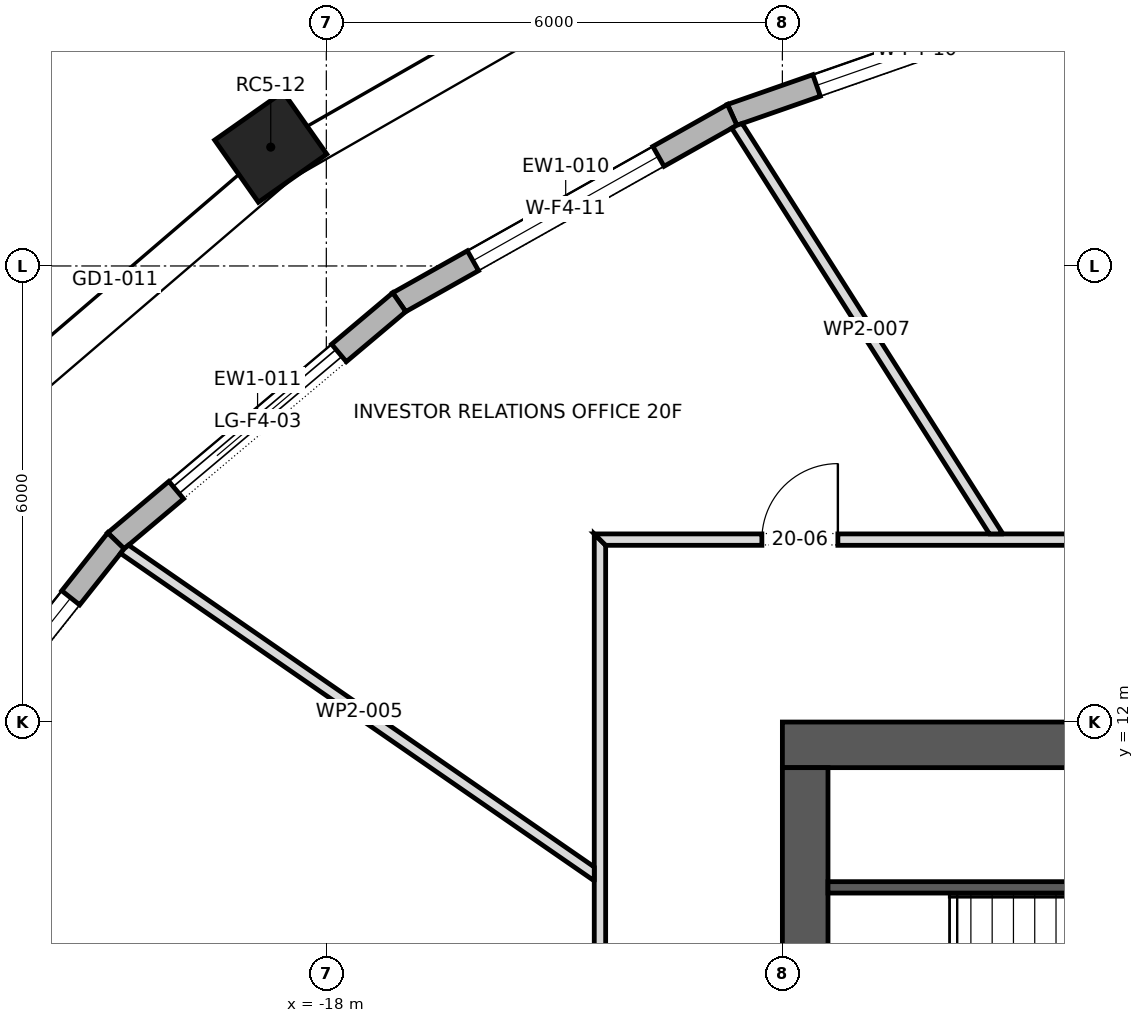
"""IFC4 building model, lengths in metres.
Left out: names, types, materials, properties, quantities, classifications, styles, units other than length and angle.
Written with IfcOpenShell. Run it as: python <this file> out.ifc"""

import sys

from ifc_helpers import new_model, si_unit, direction, frame, frame_2d, origin, origin_2d, place, context, subcontext, project, spatial, polyline, rectangle, outline, extrude, element, fill, save


model = new_model("IFC4")
c1 = context("Model", 3, precision=1e-05, world=origin(), true_north=direction((0.0, 1.0)))
c2 = subcontext(c1, "Body", "Model", "MODEL_VIEW")
j1 = project(units=[si_unit("LENGTHUNIT", "METRE"), si_unit("PLANEANGLEUNIT", "RADIAN")], contexts=[c1])
p1 = place(None, origin())
s1 = spatial("IfcSite", under=j1, at=p1, CompositionType="ELEMENT")
p2 = place(p1, origin())
s2 = spatial("IfcBuilding", under=s1, at=p2, CompositionType="ELEMENT")
p3 = place(p2, frame((0.0, 0.0, 280.3)))
s3 = spatial("IfcBuildingStorey", under=s2, at=p3, CompositionType="ELEMENT", Elevation=280.3)
p4 = place(p3, frame((-18.731, 19.564, 0.0), z_axis=(0.0, 0.0, 1.0), x_axis=(-0.817906779671, -0.575350762377, 0.0)))
e1 = element("IfcColumn", 1, at=p4, inside=s3, PredefinedType="COLUMN", context=c2, shape_type="SweptSolid", body=[
    extrude(rectangle(XDim=1.1, YDim=1.0, at=origin_2d()), origin(), (0.0, 0.0, 1.0), 4.0),
])
p5 = place(p3, frame((-12.0, 11.7, 0.0), z_axis=(0.0, 0.0, 1.0), x_axis=(1.0, 0.0, 0.0)))
e2 = element("IfcWall", 2, at=p5, inside=s3, PredefinedType="SHEAR", context=c2, shape_type="SweptSolid", body=[
    extrude(rectangle(XDim=24.0, YDim=0.6, at=frame_2d((12.0, 0.0))), origin(), (0.0, 0.0, 1.0), 4.0),
])
p6 = place(p5, frame((9.225, 0.0, 0.0)))
e3 = element("IfcOpeningElement", 3, at=p6, cuts=e2, PredefinedType="OPENING", context=c2, shape_type="SweptSolid", body=[
    extrude(rectangle(XDim=0.9, YDim=2.1, at=frame_2d((0.45, 1.05))), frame((0.0, 0.312, 0.0), z_axis=(0.0, -1.0, 0.0), x_axis=(1.0, 0.0, 0.0)), (0.0, 0.0, 1.0), 0.624),
])
p7 = place(p5, frame((10.925, 0.0, 0.0)))
e4 = element("IfcOpeningElement", 4, at=p7, cuts=e2, PredefinedType="OPENING", context=c2, shape_type="SweptSolid", body=[
    extrude(rectangle(XDim=0.8, YDim=2.1, at=frame_2d((0.4, 1.05))), frame((0.0, 0.312, 0.0), z_axis=(0.0, -1.0, 0.0), x_axis=(1.0, 0.0, 0.0)), (0.0, 0.0, 1.0), 0.624),
])
p8 = place(p5, frame((4.2, 0.0, 0.0)))
e5 = element("IfcOpeningElement", 5, at=p8, cuts=e2, PredefinedType="OPENING", context=c2, shape_type="SweptSolid", body=[
    extrude(rectangle(XDim=0.8, YDim=2.1, at=frame_2d((0.4, 1.05))), frame((0.0, 0.312, 0.0), z_axis=(0.0, -1.0, 0.0), x_axis=(1.0, 0.0, 0.0)), (0.0, 0.0, 1.0), 0.624),
])
p9 = place(p5, frame((13.8, 0.0, 0.0)))
e6 = element("IfcOpeningElement", 6, at=p9, cuts=e2, PredefinedType="OPENING", context=c2, shape_type="SweptSolid", body=[
    extrude(rectangle(XDim=0.8, YDim=2.1, at=frame_2d((0.4, 1.05))), frame((0.0, 0.312, 0.0), z_axis=(0.0, -1.0, 0.0), x_axis=(1.0, 0.0, 0.0)), (0.0, 0.0, 1.0), 0.624),
])
p10 = place(p5, frame((16.6, 0.0, 0.0)))
e7 = element("IfcOpeningElement", 7, at=p10, cuts=e2, PredefinedType="OPENING", context=c2, shape_type="SweptSolid", body=[
    extrude(rectangle(XDim=0.8, YDim=2.1, at=frame_2d((0.4, 1.05))), frame((0.0, 0.312, 0.0), z_axis=(0.0, -1.0, 0.0), x_axis=(1.0, 0.0, 0.0)), (0.0, 0.0, 1.0), 0.624),
])
p11 = place(p3, frame((-11.7, -11.4, 0.0), z_axis=(0.0, 0.0, 1.0), x_axis=(0.0, 1.0, 0.0)))
e8 = element("IfcWall", 8, at=p11, inside=s3, PredefinedType="SHEAR", context=c2, shape_type="SweptSolid", body=[
    extrude(rectangle(XDim=22.8, YDim=0.6, at=frame_2d((11.4, 0.0))), origin(), (0.0, 0.0, 1.0), 4.0),
])
p12 = place(p11, frame((10.2, 0.0, 0.0)))
e9 = element("IfcOpeningElement", 9, at=p12, cuts=e8, PredefinedType="OPENING", context=c2, shape_type="SweptSolid", body=[
    extrude(rectangle(XDim=2.4, YDim=2.1, at=frame_2d((1.2, 1.05))), frame((0.0, 0.312, 0.0), z_axis=(0.0, -1.0, 0.0), x_axis=(1.0, 0.0, 0.0)), (0.0, 0.0, 1.0), 0.624),
])
p13 = place(p11, frame((18.925, 0.0, 0.0)))
e10 = element("IfcOpeningElement", 10, at=p13, cuts=e8, PredefinedType="OPENING", context=c2, shape_type="SweptSolid", body=[
    extrude(rectangle(XDim=1.2, YDim=2.1, at=frame_2d((0.6, 1.05))), frame((0.0, 0.312, 0.0), z_axis=(0.0, -1.0, 0.0), x_axis=(1.0, 0.0, 0.0)), (0.0, 0.0, 1.0), 0.624),
])
p14 = place(p11, frame((2.675, 0.0, 0.0)))
e11 = element("IfcOpeningElement", 11, at=p14, cuts=e8, PredefinedType="OPENING", context=c2, shape_type="SweptSolid", body=[
    extrude(rectangle(XDim=1.2, YDim=2.1, at=frame_2d((0.6, 1.05))), frame((0.0, 0.312, 0.0), z_axis=(0.0, -1.0, 0.0), x_axis=(1.0, 0.0, 0.0)), (0.0, 0.0, 1.0), 0.624),
])
p15 = place(p3, frame((-7.796, 21.685, 0.0), z_axis=(0.0, 0.0, 1.0), x_axis=(-0.944204293701, -0.329360367617, 0.0)))
e12 = element("IfcWall", 12, at=p15, inside=s3, PredefinedType="STANDARD", context=c2, shape_type="SweptSolid", body=[
    extrude(outline(polyline([(-0.013, -0.15), (5.166, -0.15), (5.139, 0.15), (0.013, 0.15), (-0.013, -0.15)])), origin(), (0.0, 0.0, 1.0), 3.7),
])
p16 = place(p15, frame((1.176, 0.0, 0.6)))
e13 = element("IfcOpeningElement", 13, at=p16, cuts=e12, PredefinedType="OPENING", context=c2, shape_type="SweptSolid", body=[
    extrude(rectangle(XDim=2.8, YDim=2.65, at=frame_2d((1.4, 1.325))), frame((0.0, 0.162, 0.0), z_axis=(0.0, -1.0, 0.0), x_axis=(1.0, 0.0, 0.0)), (0.0, 0.0, 1.0), 0.324),
])
p17 = place(p3, frame((-12.661, 19.988, 0.0), z_axis=(0.0, 0.0, 1.0), x_axis=(-0.871488606878, -0.490415750239, 0.0)))
e14 = element("IfcWall", 14, at=p17, inside=s3, PredefinedType="STANDARD", context=c2, shape_type="SweptSolid", body=[
    extrude(outline(polyline([(-0.013, -0.15), (5.04, -0.15), (5.012, 0.15), (0.013, 0.15), (-0.013, -0.15)])), origin(), (0.0, 0.0, 1.0), 3.7),
])
p18 = place(p17, frame((1.113, 0.0, 0.6)))
e15 = element("IfcOpeningElement", 15, at=p18, cuts=e14, PredefinedType="OPENING", context=c2, shape_type="SweptSolid", body=[
    extrude(rectangle(XDim=2.8, YDim=2.65, at=frame_2d((1.4, 1.325))), frame((0.0, 0.162, 0.0), z_axis=(0.0, -1.0, 0.0), x_axis=(1.0, 0.0, 0.0)), (0.0, 0.0, 1.0), 0.324),
])
p19 = place(p3, frame((-17.041, 17.523, 0.0), z_axis=(0.0, 0.0, 1.0), x_axis=(-0.764876116592, -0.644177402792, 0.0)))
e16 = element("IfcWall", 16, at=p19, inside=s3, PredefinedType="STANDARD", context=c2, shape_type="SweptSolid", body=[
    extrude(outline(polyline([(-0.014, -0.15), (4.888, -0.15), (4.858, 0.15), (0.014, 0.15), (-0.014, -0.15)])), origin(), (0.0, 0.0, 1.0), 3.7),
])
p20 = place(p19, frame((1.036, 0.0, 0.0)))
e17 = element("IfcOpeningElement", 17, at=p20, cuts=e16, PredefinedType="OPENING", context=c2, shape_type="SweptSolid", body=[
    extrude(rectangle(XDim=2.8, YDim=3.25, at=frame_2d((1.4, 1.625))), frame((0.0, 0.162, 0.0), z_axis=(0.0, -1.0, 0.0), x_axis=(1.0, 0.0, 0.0)), (0.0, 0.0, 1.0), 0.324),
])
p21 = place(p3, frame((-20.768, 14.384, 0.0), z_axis=(0.0, 0.0, 1.0), x_axis=(-0.621544881236, -0.783378555112, 0.0)))
e18 = element("IfcWall", 18, at=p21, inside=s3, PredefinedType="STANDARD", context=c2, shape_type="SweptSolid", body=[
    extrude(outline(polyline([(-0.015, -0.15), (4.73, -0.15), (4.698, 0.15), (0.015, 0.15), (-0.015, -0.15)])), origin(), (0.0, 0.0, 1.0), 3.7),
])
p22 = place(p21, frame((0.957, 0.0, 0.6)))
e19 = element("IfcOpeningElement", 19, at=p22, cuts=e18, PredefinedType="OPENING", context=c2, shape_type="SweptSolid", body=[
    extrude(rectangle(XDim=2.8, YDim=2.65, at=frame_2d((1.4, 1.325))), frame((0.0, 0.162, 0.0), z_axis=(0.0, -1.0, 0.0), x_axis=(1.0, 0.0, 0.0)), (0.0, 0.0, 1.0), 0.324),
])
p23 = place(p3, frame((-11.4, 9.825, 0.0), z_axis=(0.0, 0.0, 1.0), x_axis=(1.0, 0.0, 0.0)))
e20 = element("IfcWall", 20, at=p23, inside=s3, PredefinedType="SHEAR", context=c2, shape_type="SweptSolid", body=[
    extrude(rectangle(XDim=8.0, YDim=0.15, at=frame_2d((4.0, 0.0))), origin(), (0.0, 0.0, 1.0), 3.7),
])
p24 = place(p3, frame((-14.4, -14.475, 0.0), z_axis=(0.0, 0.0, 1.0), x_axis=(0.0, 1.0, 0.0)))
e21 = element("IfcWall", 21, at=p24, inside=s3, PredefinedType="PARTITIONING", context=c2, shape_type="SweptSolid", body=[
    extrude(outline(polyline([(0.15, -0.075), (2.06, -0.075), (3.97, -0.075), (5.88, -0.075), (7.79, -0.075), (9.7, -0.075), (11.61, -0.075), (13.52, -0.075), (15.43, -0.075), (17.34, -0.075), (19.25, -0.075), (21.16, -0.075), (23.07, -0.075), (24.98, -0.075), (26.89, -0.075), (28.8, -0.075), (28.95, 0.075), (27.02, 0.075), (25.09, 0.075), (23.16, 0.075), (21.23, 0.075), (19.3, 0.075), (17.37, 0.075), (15.44, 0.075), (13.51, 0.075), (11.58, 0.075), (9.65, 0.075), (7.72, 0.075), (5.79, 0.075), (3.86, 0.075), (1.93, 0.075), (0.0, 0.075), (0.15, -0.075)])), origin(), (0.0, 0.0, 1.0), 3.7),
])
p25 = place(p24, frame((19.545, 0.0, 0.0)))
e22 = element("IfcOpeningElement", 22, at=p25, cuts=e21, PredefinedType="OPENING", context=c2, shape_type="SweptSolid", body=[
    extrude(rectangle(XDim=1.0, YDim=2.1, at=frame_2d((0.5, 1.05))), frame((0.0, 0.087, 0.0), z_axis=(0.0, -1.0, 0.0), x_axis=(1.0, 0.0, 0.0)), (0.0, 0.0, 1.0), 0.174),
])
p26 = place(p24, frame((11.33, 0.0, 0.0)))
e23 = element("IfcOpeningElement", 23, at=p26, cuts=e21, PredefinedType="OPENING", context=c2, shape_type="SweptSolid", body=[
    extrude(rectangle(XDim=1.0, YDim=2.1, at=frame_2d((0.5, 1.05))), frame((0.0, 0.087, 0.0), z_axis=(0.0, -1.0, 0.0), x_axis=(1.0, 0.0, 0.0)), (0.0, 0.0, 1.0), 0.174),
])
p27 = place(p3, frame((-14.433, 9.972, 0.0), z_axis=(0.0, 0.0, 1.0), x_axis=(-0.822596869136, 0.568625000231, 0.0)))
e24 = element("IfcWall", 24, at=p27, inside=s3, PredefinedType="PARTITIONING", context=c2, shape_type="SweptSolid", body=[
    extrude(outline(polyline([(0.103, -0.075), (1.965, -0.075), (3.827, -0.075), (5.689, -0.075), (7.551, -0.075), (7.571, -0.002), (7.576, 0.069), (7.576, 0.075), (5.682, 0.075), (3.788, 0.075), (1.894, 0.075), (0.0, 0.075), (0.0, 0.074), (0.103, -0.075)])), origin(), (0.0, 0.0, 1.0), 3.7),
])
p28 = place(p3, frame((-14.475, 14.4, 0.0), z_axis=(0.0, 0.0, 1.0), x_axis=(1.0, 0.0, 0.0)))
e25 = element("IfcWall", 25, at=p28, inside=s3, PredefinedType="PARTITIONING", context=c2, shape_type="SweptSolid", body=[
    extrude(outline(polyline([(0.15, -0.075), (2.06, -0.075), (3.97, -0.075), (5.88, -0.075), (7.79, -0.075), (9.7, -0.075), (11.61, -0.075), (13.52, -0.075), (15.43, -0.075), (17.34, -0.075), (19.25, -0.075), (21.16, -0.075), (23.07, -0.075), (24.98, -0.075), (26.89, -0.075), (28.8, -0.075), (28.95, 0.075), (27.02, 0.075), (25.09, 0.075), (23.16, 0.075), (21.23, 0.075), (19.3, 0.075), (17.37, 0.075), (15.44, 0.075), (13.51, 0.075), (11.58, 0.075), (9.65, 0.075), (7.72, 0.075), (5.79, 0.075), (3.86, 0.075), (1.93, 0.075), (0.0, 0.075), (0.15, -0.075)])), origin(), (0.0, 0.0, 1.0), 3.7),
])
p29 = place(p28, frame((20.15, 0.0, 0.0)))
e26 = element("IfcOpeningElement", 26, at=p29, cuts=e25, PredefinedType="OPENING", context=c2, shape_type="SweptSolid", body=[
    extrude(rectangle(XDim=1.0, YDim=2.1, at=frame_2d((0.5, 1.05))), frame((0.0, 0.087, 0.0), z_axis=(0.0, -1.0, 0.0), x_axis=(1.0, 0.0, 0.0)), (0.0, 0.0, 1.0), 0.174),
])
p30 = place(p28, frame((8.565, 0.0, 0.0)))
e27 = element("IfcOpeningElement", 27, at=p30, cuts=e25, PredefinedType="OPENING", context=c2, shape_type="SweptSolid", body=[
    extrude(rectangle(XDim=1.0, YDim=2.1, at=frame_2d((0.5, 1.05))), frame((0.0, 0.087, 0.0), z_axis=(0.0, -1.0, 0.0), x_axis=(1.0, 0.0, 0.0)), (0.0, 0.0, 1.0), 0.174),
])
p31 = place(p28, frame((2.205, 0.0, 0.0)))
e28 = element("IfcOpeningElement", 28, at=p31, cuts=e25, PredefinedType="OPENING", context=c2, shape_type="SweptSolid", body=[
    extrude(rectangle(XDim=1.0, YDim=2.1, at=frame_2d((0.5, 1.05))), frame((0.0, 0.087, 0.0), z_axis=(0.0, -1.0, 0.0), x_axis=(1.0, 0.0, 0.0)), (0.0, 0.0, 1.0), 0.174),
])
p32 = place(p3, frame((-9.162, 14.435, 0.0), z_axis=(0.0, 0.0, 1.0), x_axis=(-0.536136809147, 0.844131104674, 0.0)))
e29 = element("IfcWall", 29, at=p32, inside=s3, PredefinedType="PARTITIONING", context=c2, shape_type="SweptSolid", body=[
    extrude(outline(polyline([(0.0, -0.075), (1.599, -0.075), (3.198, -0.075), (4.798, -0.075), (6.397, -0.075), (6.414, -0.002), (6.417, 0.066), (6.417, 0.075), (4.837, 0.075), (3.256, 0.075), (1.676, 0.075), (0.095, 0.075), (0.0, -0.074), (0.0, -0.075)])), origin(), (0.0, 0.0, 1.0), 3.7),
])
p33 = place(p16, origin())
e30 = element("IfcWindow", 30, at=p33, inside=s3, PartitioningType="DOUBLE_PANEL_VERTICAL", PredefinedType="WINDOW", context=c2, shape_type="SweptSolid", body=[
    extrude(rectangle(XDim=2.8, YDim=2.65, at=frame_2d((1.4, 1.325))), frame((0.0, 0.03, 0.0), z_axis=(0.0, -1.0, 0.0), x_axis=(1.0, 0.0, 0.0)), (0.0, 0.0, 1.0), 0.06),
])
fill(e13, e30)
p34 = place(p18, origin())
e31 = element("IfcWindow", 31, at=p34, inside=s3, PartitioningType="DOUBLE_PANEL_VERTICAL", PredefinedType="WINDOW", context=c2, shape_type="SweptSolid", body=[
    extrude(rectangle(XDim=2.8, YDim=2.65, at=frame_2d((1.4, 1.325))), frame((0.0, 0.03, 0.0), z_axis=(0.0, -1.0, 0.0), x_axis=(1.0, 0.0, 0.0)), (0.0, 0.0, 1.0), 0.06),
])
fill(e15, e31)
p35 = place(p20, origin())
e32 = element("IfcDoor", 32, at=p35, inside=s3, OperationType="DOUBLE_DOOR_SLIDING", PredefinedType="DOOR", context=c2, shape_type="SweptSolid", body=[
    extrude(rectangle(XDim=2.8, YDim=3.25, at=frame_2d((1.4, 1.625))), frame((0.0, 0.025, 0.0), z_axis=(0.0, -1.0, 0.0), x_axis=(1.0, 0.0, 0.0)), (0.0, 0.0, 1.0), 0.05),
])
fill(e17, e32)
p36 = place(p22, origin())
e33 = element("IfcWindow", 33, at=p36, inside=s3, PartitioningType="DOUBLE_PANEL_VERTICAL", PredefinedType="WINDOW", context=c2, shape_type="SweptSolid", body=[
    extrude(rectangle(XDim=2.8, YDim=2.65, at=frame_2d((1.4, 1.325))), frame((0.0, 0.03, 0.0), z_axis=(0.0, -1.0, 0.0), x_axis=(1.0, 0.0, 0.0)), (0.0, 0.0, 1.0), 0.06),
])
fill(e19, e33)
p37 = place(p31, origin())
e34 = element("IfcDoor", 34, at=p37, inside=s3, OperationType="SINGLE_SWING_LEFT", PredefinedType="DOOR", context=c2, shape_type="SweptSolid", body=[
    extrude(rectangle(XDim=1.0, YDim=2.1, at=frame_2d((0.5, 1.05))), frame((0.0, 0.025, 0.0), z_axis=(0.0, -1.0, 0.0), x_axis=(1.0, 0.0, 0.0)), (0.0, 0.0, 1.0), 0.05),
])
fill(e28, e34)
save(model, sys.argv[1])
